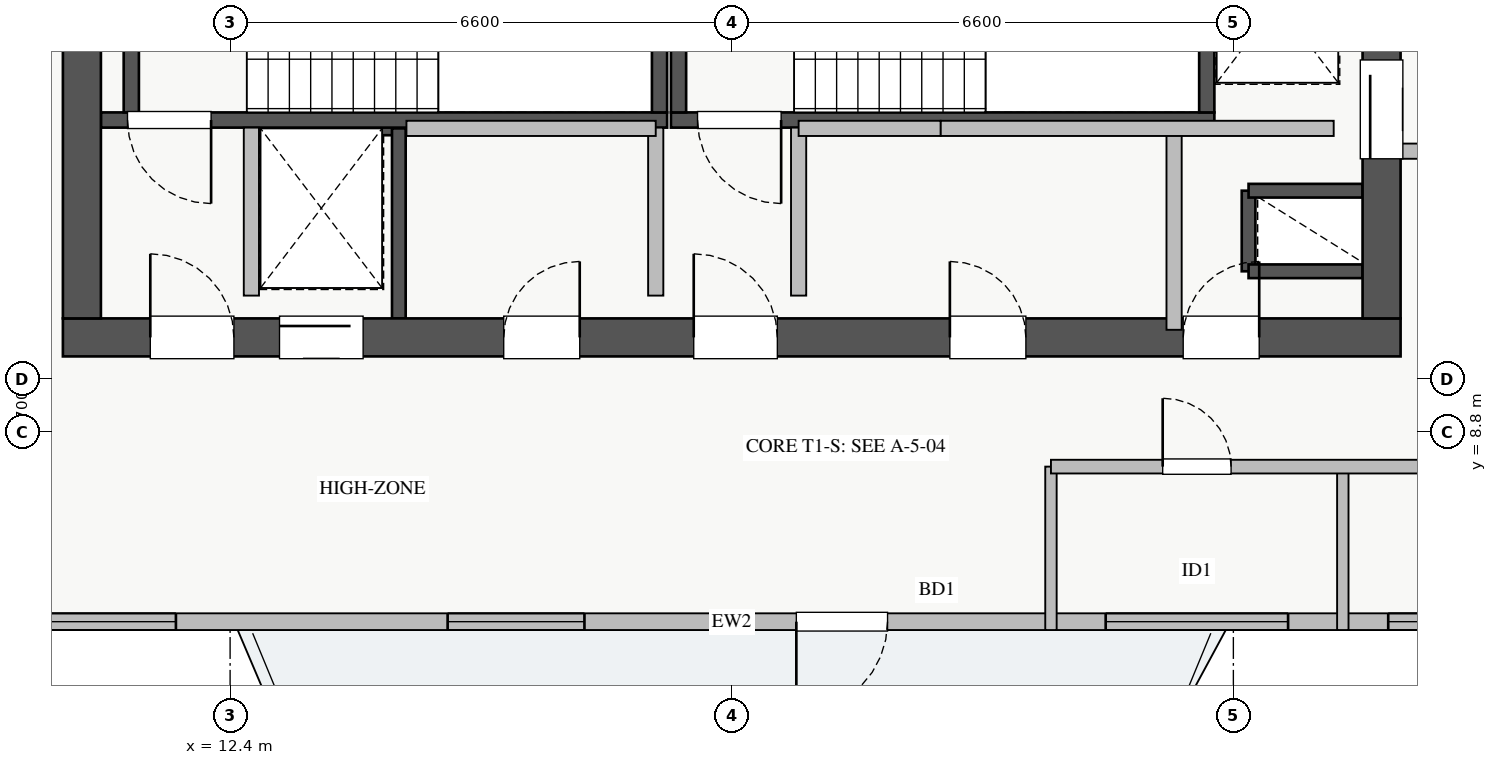
"""IFC4 building model, lengths in metres.
Left out: names, types, materials, properties, quantities, classifications, styles, units other than length and angle.
Written with IfcOpenShell. Run it as: python <this file> out.ifc"""

import sys

from ifc_helpers import new_model, si_unit, direction, frame, frame_2d, origin, place, context, subcontext, project, spatial, rectangle, extrude, source, transform, mapped, element, fill, save


model = new_model("IFC4")
c1 = context("Model", 3, precision=1e-05, world=origin(), true_north=direction((0.0, 1.0)))
c2 = subcontext(c1, "Body", "Model", "MODEL_VIEW")
j1 = project(units=[si_unit("LENGTHUNIT", "METRE"), si_unit("PLANEANGLEUNIT", "RADIAN")], contexts=[c1])
p1 = place(None, origin())
s1 = spatial("IfcSite", under=j1, at=p1, CompositionType="ELEMENT")
p2 = place(p1, origin())
s2 = spatial("IfcBuilding", under=s1, at=p2, CompositionType="ELEMENT")
p3 = place(p2, frame((0.0, 0.0, 226.25)))
s3 = spatial("IfcBuildingStorey", under=s2, at=p3, CompositionType="ELEMENT", Elevation=226.25)
p4 = place(p3, frame((12.68, 12.8, 0.0), z_axis=(0.0, 0.0, 1.0), x_axis=(1.0, 0.0, 0.0)))
e1 = element("IfcWall", 1, at=p4, inside=s3, PredefinedType="SHEAR", context=c2, shape_type="SweptSolid", body=[
    extrude(rectangle(XDim=1.94, YDim=0.18, at=frame_2d((0.97, 0.0))), origin(), (0.0, 0.0, 1.0), 3.07),
])
p5 = place(p3, frame((14.62, 10.3, 0.0), z_axis=(0.0, 0.0, 1.0), x_axis=(0.0, 1.0, 0.0)))
e2 = element("IfcWall", 2, at=p5, inside=s3, PredefinedType="SHEAR", context=c2, shape_type="SweptSolid", body=[
    extrude(rectangle(XDim=2.5, YDim=0.18, at=frame_2d((1.25, 0.0))), origin(), (0.0, 0.0, 1.0), 3.07),
])
p6 = place(p3, frame((25.8, 10.92, 0.0), z_axis=(0.0, 0.0, 1.0), x_axis=(0.0, 1.0, 0.0)))
e3 = element("IfcWall", 3, at=p6, inside=s3, PredefinedType="SHEAR", context=c2, shape_type="SweptSolid", body=[
    extrude(rectangle(XDim=1.06, YDim=0.18, at=frame_2d((0.53, 0.0))), origin(), (0.0, 0.0, 1.0), 3.07),
])
for number, where, z_axis, x_axis in (
    (4, (25.8, 11.98, 0.0), (0.0, 0.0, 1.0), (1.0, 0.0, 0.0)),
    (5, (25.8, 10.92, 0.0), (0.0, 0.0, 1.0), (1.0, 0.0, 0.0)),
):
    element("IfcWall", number, at=place(p3, frame(where, z_axis=z_axis, x_axis=x_axis)), inside=s3, PredefinedType="SHEAR", context=c2, shape_type="SweptSolid", body=[
        extrude(rectangle(XDim=1.5, YDim=0.18, at=frame_2d((0.75, 0.0))), origin(), (0.0, 0.0, 1.0), 3.07),
    ])
p7 = place(p3, frame((10.7, 12.91, 0.0), z_axis=(0.0, 0.0, 1.0), x_axis=(1.0, 0.0, 0.0)))
e6 = element("IfcWall", 6, at=p7, inside=s3, PredefinedType="SHEAR", context=c2, shape_type="SweptSolid", body=[
    extrude(rectangle(XDim=7.45, YDim=0.2, at=frame_2d((3.725, 0.0))), origin(), (0.0, 0.0, 1.0), 3.25),
])
p8 = place(p7, frame((0.35, 0.0, 0.0)))
e7 = element("IfcOpeningElement", 7, at=p8, cuts=e6, PredefinedType="OPENING", context=c2, shape_type="SweptSolid", body=[
    extrude(rectangle(XDim=1.1, YDim=2.05, at=frame_2d((0.55, 1.025))), frame((0.0, 0.11, 0.0), z_axis=(0.0, -1.0, 0.0), x_axis=(1.0, 0.0, 0.0)), (0.0, 0.0, 1.0), 0.22),
])
for number, where, z_axis, x_axis in (
    (8, (11.1, 13.01, 0.0), (0.0, 0.0, 1.0), (0.0, 1.0, 0.0)),
    (9, (18.05, 13.01, 0.0), (0.0, 0.0, 1.0), (0.0, 1.0, 0.0)),
):
    element("IfcWall", number, at=place(p3, frame(where, z_axis=z_axis, x_axis=x_axis)), inside=s3, PredefinedType="SHEAR", context=c2, shape_type="SweptSolid", body=[
        extrude(rectangle(XDim=2.94, YDim=0.2, at=frame_2d((1.47, 0.0))), origin(), (0.0, 0.0, 1.0), 3.25),
    ])
p9 = place(p3, frame((18.2, 12.91, 0.0), z_axis=(0.0, 0.0, 1.0), x_axis=(1.0, 0.0, 0.0)))
e10 = element("IfcWall", 10, at=p9, inside=s3, PredefinedType="SHEAR", context=c2, shape_type="SweptSolid", body=[
    extrude(rectangle(XDim=7.15, YDim=0.2, at=frame_2d((3.575, 0.0))), origin(), (0.0, 0.0, 1.0), 3.25),
])
p10 = place(p9, frame((0.35, 0.0, 0.0)))
e11 = element("IfcOpeningElement", 11, at=p10, cuts=e10, PredefinedType="OPENING", context=c2, shape_type="SweptSolid", body=[
    extrude(rectangle(XDim=1.1, YDim=2.05, at=frame_2d((0.55, 1.025))), frame((0.0, 0.11, 0.0), z_axis=(0.0, -1.0, 0.0), x_axis=(1.0, 0.0, 0.0)), (0.0, 0.0, 1.0), 0.22),
])
for number, where, z_axis, x_axis in (
    (12, (18.3, 13.01, 0.0), (0.0, 0.0, 1.0), (0.0, 1.0, 0.0)),
    (13, (25.25, 13.01, 0.0), (0.0, 0.0, 1.0), (0.0, 1.0, 0.0)),
):
    element("IfcWall", number, at=place(p3, frame(where, z_axis=z_axis, x_axis=x_axis)), inside=s3, PredefinedType="SHEAR", context=c2, shape_type="SweptSolid", body=[
        extrude(rectangle(XDim=2.94, YDim=0.2, at=frame_2d((1.47, 0.0))), origin(), (0.0, 0.0, 1.0), 3.25),
    ])
p11 = place(p3, frame((10.2, 10.05, 0.0), z_axis=(0.0, 0.0, 1.0), x_axis=(1.0, 0.0, 0.0)))
e14 = element("IfcWall", 14, at=p11, inside=s3, PredefinedType="SHEAR", context=c2, shape_type="SweptSolid", body=[
    extrude(rectangle(XDim=17.6, YDim=0.5, at=frame_2d((8.8, 0.0))), origin(), (0.0, 0.0, 1.0), 3.25),
])
p12 = place(p11, frame((1.15, 0.0, 0.0)))
e15 = element("IfcOpeningElement", 15, at=p12, cuts=e14, PredefinedType="OPENING", context=c2, shape_type="SweptSolid", body=[
    extrude(rectangle(XDim=1.1, YDim=2.05, at=frame_2d((0.55, 1.025))), frame((0.0, 0.26, 0.0), z_axis=(0.0, -1.0, 0.0), x_axis=(1.0, 0.0, 0.0)), (0.0, 0.0, 1.0), 0.52),
])
p13 = place(p11, frame((8.3, 0.0, 0.0)))
e16 = element("IfcOpeningElement", 16, at=p13, cuts=e14, PredefinedType="OPENING", context=c2, shape_type="SweptSolid", body=[
    extrude(rectangle(XDim=1.1, YDim=2.05, at=frame_2d((0.55, 1.025))), frame((0.0, 0.26, 0.0), z_axis=(0.0, -1.0, 0.0), x_axis=(1.0, 0.0, 0.0)), (0.0, 0.0, 1.0), 0.52),
])
p14 = place(p11, frame((2.85, 0.0, 0.0)))
e17 = element("IfcOpeningElement", 17, at=p14, cuts=e14, PredefinedType="OPENING", context=c2, shape_type="SweptSolid", body=[
    extrude(rectangle(XDim=1.1, YDim=2.05, at=frame_2d((0.55, 1.025))), frame((0.0, 0.26, 0.0), z_axis=(0.0, -1.0, 0.0), x_axis=(1.0, 0.0, 0.0)), (0.0, 0.0, 1.0), 0.52),
])
p15 = place(p11, frame((5.8, 0.0, 0.0)))
e18 = element("IfcOpeningElement", 18, at=p15, cuts=e14, PredefinedType="OPENING", context=c2, shape_type="SweptSolid", body=[
    extrude(rectangle(XDim=1.0, YDim=2.05, at=frame_2d((0.5, 1.025))), frame((0.0, 0.26, 0.0), z_axis=(0.0, -1.0, 0.0), x_axis=(1.0, 0.0, 0.0)), (0.0, 0.0, 1.0), 0.52),
])
p16 = place(p11, frame((14.74, 0.0, 0.0)))
e19 = element("IfcOpeningElement", 19, at=p16, cuts=e14, PredefinedType="OPENING", context=c2, shape_type="SweptSolid", body=[
    extrude(rectangle(XDim=1.0, YDim=2.05, at=frame_2d((0.5, 1.025))), frame((0.0, 0.26, 0.0), z_axis=(0.0, -1.0, 0.0), x_axis=(1.0, 0.0, 0.0)), (0.0, 0.0, 1.0), 0.52),
])
p17 = place(p11, frame((11.67, 0.0, 0.0)))
e20 = element("IfcOpeningElement", 20, at=p17, cuts=e14, PredefinedType="OPENING", context=c2, shape_type="SweptSolid", body=[
    extrude(rectangle(XDim=1.0, YDim=2.05, at=frame_2d((0.5, 1.025))), frame((0.0, 0.26, 0.0), z_axis=(0.0, -1.0, 0.0), x_axis=(1.0, 0.0, 0.0)), (0.0, 0.0, 1.0), 0.52),
])
p18 = place(p3, frame((10.45, 10.3, 0.0), z_axis=(0.0, 0.0, 1.0), x_axis=(0.0, 1.0, 0.0)))
e21 = element("IfcWall", 21, at=p18, inside=s3, PredefinedType="SHEAR", context=c2, shape_type="SweptSolid", body=[
    extrude(rectangle(XDim=6.2, YDim=0.5, at=frame_2d((3.1, 0.0))), origin(), (0.0, 0.0, 1.0), 3.25),
])
p19 = place(p3, frame((27.55, 10.3, 0.0), z_axis=(0.0, 0.0, 1.0), x_axis=(0.0, 1.0, 0.0)))
e22 = element("IfcWall", 22, at=p19, inside=s3, PredefinedType="SHEAR", context=c2, shape_type="SweptSolid", body=[
    extrude(rectangle(XDim=6.2, YDim=0.5, at=frame_2d((3.1, 0.0))), origin(), (0.0, 0.0, 1.0), 3.25),
])
p20 = place(p19, frame((2.1, 0.0, 0.0)))
e23 = element("IfcOpeningElement", 23, at=p20, cuts=e22, PredefinedType="OPENING", context=c2, shape_type="SweptSolid", body=[
    extrude(rectangle(XDim=1.3, YDim=2.05, at=frame_2d((0.65, 1.025))), frame((0.0, 0.26, 0.0), z_axis=(0.0, -1.0, 0.0), x_axis=(1.0, 0.0, 0.0)), (0.0, 0.0, 1.0), 0.52),
])
p21 = place(p3, frame((7.65, 6.31, 0.0), z_axis=(0.0, 0.0, 1.0), x_axis=(1.0, 0.0, 0.0)))
e24 = element("IfcWall", 24, at=p21, inside=s3, PredefinedType="STANDARD", context=c2, shape_type="SweptSolid", body=[
    extrude(rectangle(XDim=22.7, YDim=0.22, at=frame_2d((11.35, 0.0))), origin(), (0.0, 0.0, 1.0), 2.61),
])
p22 = place(p21, frame((12.2, 0.0, 0.0)))
e25 = element("IfcOpeningElement", 25, at=p22, cuts=e24, PredefinedType="OPENING", context=c2, shape_type="SweptSolid", body=[
    extrude(rectangle(XDim=1.2, YDim=2.1, at=frame_2d((0.6, 1.05))), frame((0.0, 0.12, 0.0), z_axis=(0.0, -1.0, 0.0), x_axis=(1.0, 0.0, 0.0)), (0.0, 0.0, 1.0), 0.24),
])
p23 = place(p21, frame((1.637, 0.0, 0.9)))
e26 = element("IfcOpeningElement", 26, at=p23, cuts=e24, PredefinedType="OPENING", context=c2, shape_type="SweptSolid", body=[
    extrude(rectangle(XDim=2.4, YDim=1.48, at=frame_2d((1.2, 0.74))), frame((0.0, 0.12, 0.0), z_axis=(0.0, -1.0, 0.0), x_axis=(1.0, 0.0, 0.0)), (0.0, 0.0, 1.0), 0.24),
])
p24 = place(p21, frame((7.612, 0.0, 0.9)))
e27 = element("IfcOpeningElement", 27, at=p24, cuts=e24, PredefinedType="OPENING", context=c2, shape_type="SweptSolid", body=[
    extrude(rectangle(XDim=1.8, YDim=1.45, at=frame_2d((0.9, 0.725))), frame((0.0, 0.12, 0.0), z_axis=(0.0, -1.0, 0.0), x_axis=(1.0, 0.0, 0.0)), (0.0, 0.0, 1.0), 0.24),
])
p25 = place(p21, frame((19.988, 0.0, 0.9)))
e28 = element("IfcOpeningElement", 28, at=p25, cuts=e24, PredefinedType="OPENING", context=c2, shape_type="SweptSolid", body=[
    extrude(rectangle(XDim=2.1, YDim=1.5, at=frame_2d((1.05, 0.75))), frame((0.0, 0.12, 0.0), z_axis=(0.0, -1.0, 0.0), x_axis=(1.0, 0.0, 0.0)), (0.0, 0.0, 1.0), 0.24),
])
p26 = place(p21, frame((16.27, 0.0, 0.9)))
e29 = element("IfcOpeningElement", 29, at=p26, cuts=e24, PredefinedType="OPENING", context=c2, shape_type="SweptSolid", body=[
    extrude(rectangle(XDim=2.4, YDim=1.5, at=frame_2d((1.2, 0.75))), frame((0.0, 0.12, 0.0), z_axis=(0.0, -1.0, 0.0), x_axis=(1.0, 0.0, 0.0)), (0.0, 0.0, 1.0), 0.24),
])
p27 = place(p3, frame((27.8, 12.5, 0.0), z_axis=(0.0, 0.0, 1.0), x_axis=(1.0, 0.0, 0.0)))
e30 = element("IfcWall", 30, at=p27, inside=s3, PredefinedType="PARTITIONING", context=c2, shape_type="SweptSolid", body=[
    extrude(rectangle(XDim=3.1, YDim=0.2, at=frame_2d((1.55, 0.0))), origin(), (0.0, 0.0, 1.0), 2.265),
])
for number, where, z_axis, x_axis in (
    (31, (12.68, 10.6, 0.0), (0.0, 0.0, 1.0), (0.0, 1.0, 0.0)),
    (32, (18.0, 10.6, 0.0), (0.0, 0.0, 1.0), (0.0, 1.0, 0.0)),
    (33, (19.88, 10.6, 0.0), (0.0, 0.0, 1.0), (0.0, 1.0, 0.0)),
):
    element("IfcWall", number, at=place(p3, frame(where, z_axis=z_axis, x_axis=x_axis)), inside=s3, PredefinedType="PARTITIONING", context=c2, shape_type="SweptSolid", body=[
        extrude(rectangle(XDim=2.21, YDim=0.2, at=frame_2d((1.105, 0.0))), origin(), (0.0, 0.0, 1.0), 3.07),
    ])
p28 = place(p3, frame((14.72, 12.8, 0.0), z_axis=(0.0, 0.0, 1.0), x_axis=(1.0, 0.0, 0.0)))
e34 = element("IfcWall", 34, at=p28, inside=s3, PredefinedType="PARTITIONING", context=c2, shape_type="SweptSolid", body=[
    extrude(rectangle(XDim=3.28, YDim=0.2, at=frame_2d((1.64, 0.0))), origin(), (0.0, 0.0, 1.0), 3.07),
])
p29 = place(p3, frame((24.82, 10.15, 0.0), z_axis=(0.0, 0.0, 1.0), x_axis=(0.0, 1.0, 0.0)))
e35 = element("IfcWall", 35, at=p29, inside=s3, PredefinedType="PARTITIONING", context=c2, shape_type="SweptSolid", body=[
    extrude(rectangle(XDim=2.65, YDim=0.2, at=frame_2d((1.325, 0.0))), origin(), (0.0, 0.0, 1.0), 3.07),
])
p30 = place(p3, frame((19.88, 12.8, 0.0), z_axis=(0.0, 0.0, 1.0), x_axis=(1.0, 0.0, 0.0)))
e36 = element("IfcWall", 36, at=p30, inside=s3, PredefinedType="PARTITIONING", context=c2, shape_type="SweptSolid", body=[
    extrude(rectangle(XDim=1.87, YDim=0.2, at=frame_2d((0.935, 0.0))), origin(), (0.0, 0.0, 1.0), 3.07),
])
p31 = place(p3, frame((21.75, 12.8, 0.0), z_axis=(0.0, 0.0, 1.0), x_axis=(1.0, 0.0, 0.0)))
e37 = element("IfcWall", 37, at=p31, inside=s3, PredefinedType="PARTITIONING", context=c2, shape_type="SweptSolid", body=[
    extrude(rectangle(XDim=5.17, YDim=0.2, at=frame_2d((2.585, 0.0))), origin(), (0.0, 0.0, 1.0), 3.07),
])
for number, where, z_axis, x_axis in (
    (38, (23.2, 6.2, 0.0), (0.0, 0.0, 1.0), (0.0, 1.0, 0.0)),
    (39, (27.04, 6.2, 0.0), (0.0, 0.0, 1.0), (0.0, 1.0, 0.0)),
):
    element("IfcWall", number, at=place(p3, frame(where, z_axis=z_axis, x_axis=x_axis)), inside=s3, PredefinedType="PARTITIONING", context=c2, shape_type="SweptSolid", body=[
        extrude(rectangle(XDim=2.15, YDim=0.15, at=frame_2d((1.075, 0.0))), origin(), (0.0, 0.0, 1.0), 3.07),
    ])
p32 = place(p3, frame((23.2, 8.35, 0.0), z_axis=(0.0, 0.0, 1.0), x_axis=(1.0, 0.0, 0.0)))
e40 = element("IfcWall", 40, at=p32, inside=s3, PredefinedType="PARTITIONING", context=c2, shape_type="SweptSolid", body=[
    extrude(rectangle(XDim=9.25, YDim=0.18, at=frame_2d((4.625, 0.0))), origin(), (0.0, 0.0, 1.0), 3.07),
])
p33 = place(p32, frame((1.47, 0.0, 0.0)))
e41 = element("IfcOpeningElement", 41, at=p33, cuts=e40, PredefinedType="OPENING", context=c2, shape_type="SweptSolid", body=[
    extrude(rectangle(XDim=0.9, YDim=2.05, at=frame_2d((0.45, 1.025))), frame((0.0, 0.1, 0.0), z_axis=(0.0, -1.0, 0.0), x_axis=(1.0, 0.0, 0.0)), (0.0, 0.0, 1.0), 0.2),
])
p34 = place(p32, frame((5.164, 0.0, 0.0)))
e42 = element("IfcOpeningElement", 42, at=p34, cuts=e40, PredefinedType="OPENING", context=c2, shape_type="SweptSolid", body=[
    extrude(rectangle(XDim=0.9, YDim=2.05, at=frame_2d((0.45, 1.025))), frame((0.0, 0.1, 0.0), z_axis=(0.0, -1.0, 0.0), x_axis=(1.0, 0.0, 0.0)), (0.0, 0.0, 1.0), 0.2),
])
m1 = source(origin(), c2, "Body", "SweptSolid", [
    extrude(rectangle(XDim=1.2, YDim=2.1, at=frame_2d((0.6, 1.05))), frame((0.0, 0.025, 0.0), z_axis=(0.0, -1.0, 0.0), x_axis=(1.0, 0.0, 0.0)), (0.0, 0.0, 1.0), 0.05),
])
p35 = place(p22, frame((1.2, 0.0, 0.0), z_axis=(0.0, 0.0, 1.0), x_axis=(-1.0, 0.0, 0.0)))
e43 = element("IfcDoor", 43, at=p35, inside=s3, OperationType="SINGLE_SWING_LEFT", PredefinedType="DOOR", context=c2, shape_type="MappedRepresentation", body=[
    mapped(m1, transform((0.0, 0.0, 0.0), x_axis=(1.0, 0.0, 0.0), y_axis=(0.0, 1.0, 0.0), z_axis=(0.0, 0.0, 1.0), scale=1.0)),
])
fill(e25, e43)
m2 = source(origin(), c2, "Body", "SweptSolid", [
    extrude(rectangle(XDim=2.4, YDim=1.48, at=frame_2d((1.2, 0.74))), frame((0.0, 0.03, 0.0), z_axis=(0.0, -1.0, 0.0), x_axis=(1.0, 0.0, 0.0)), (0.0, 0.0, 1.0), 0.06),
])
p36 = place(p23, origin())
e44 = element("IfcWindow", 44, at=p36, inside=s3, PartitioningType="TRIPLE_PANEL_VERTICAL", PredefinedType="WINDOW", context=c2, shape_type="MappedRepresentation", body=[
    mapped(m2, transform((0.0, 0.0, 0.0), x_axis=(1.0, 0.0, 0.0), y_axis=(0.0, 1.0, 0.0), z_axis=(0.0, 0.0, 1.0), scale=1.0)),
])
fill(e26, e44)
m3 = source(origin(), c2, "Body", "SweptSolid", [
    extrude(rectangle(XDim=1.8, YDim=1.45, at=frame_2d((0.9, 0.725))), frame((0.0, 0.03, 0.0), z_axis=(0.0, -1.0, 0.0), x_axis=(1.0, 0.0, 0.0)), (0.0, 0.0, 1.0), 0.06),
])
p37 = place(p24, origin())
e45 = element("IfcWindow", 45, at=p37, inside=s3, PartitioningType="DOUBLE_PANEL_VERTICAL", PredefinedType="WINDOW", context=c2, shape_type="MappedRepresentation", body=[
    mapped(m3, transform((0.0, 0.0, 0.0), x_axis=(1.0, 0.0, 0.0), y_axis=(0.0, 1.0, 0.0), z_axis=(0.0, 0.0, 1.0), scale=1.0)),
])
fill(e27, e45)
m4 = source(origin(), c2, "Body", "SweptSolid", [
    extrude(rectangle(XDim=2.1, YDim=1.5, at=frame_2d((1.05, 0.75))), frame((0.0, 0.03, 0.0), z_axis=(0.0, -1.0, 0.0), x_axis=(1.0, 0.0, 0.0)), (0.0, 0.0, 1.0), 0.06),
])
p38 = place(p25, origin())
e46 = element("IfcWindow", 46, at=p38, inside=s3, PartitioningType="TRIPLE_PANEL_VERTICAL", PredefinedType="WINDOW", context=c2, shape_type="MappedRepresentation", body=[
    mapped(m4, transform((0.0, 0.0, 0.0), x_axis=(1.0, 0.0, 0.0), y_axis=(0.0, 1.0, 0.0), z_axis=(0.0, 0.0, 1.0), scale=1.0)),
])
fill(e28, e46)
m5 = source(origin(), c2, "Body", "SweptSolid", [
    extrude(rectangle(XDim=1.3, YDim=2.05, at=frame_2d((0.65, 1.025))), frame((0.0, 0.025, 0.0), z_axis=(0.0, -1.0, 0.0), x_axis=(1.0, 0.0, 0.0)), (0.0, 0.0, 1.0), 0.05),
])
p39 = place(p20, origin())
e47 = element("IfcDoor", 47, at=p39, inside=s3, OperationType="SLIDING_TO_RIGHT", PredefinedType="DOOR", context=c2, shape_type="MappedRepresentation", body=[
    mapped(m5, transform((0.0, 0.0, 0.0), x_axis=(1.0, 0.0, 0.0), y_axis=(0.0, 1.0, 0.0), z_axis=(0.0, 0.0, 1.0), scale=1.0)),
])
fill(e23, e47)
m6 = source(origin(), c2, "Body", "SweptSolid", [
    extrude(rectangle(XDim=1.1, YDim=2.05, at=frame_2d((0.55, 1.025))), frame((0.0, 0.025, 0.0), z_axis=(0.0, -1.0, 0.0), x_axis=(1.0, 0.0, 0.0)), (0.0, 0.0, 1.0), 0.05),
])
p40 = place(p12, origin())
e48 = element("IfcDoor", 48, at=p40, inside=s3, OperationType="SINGLE_SWING_LEFT", PredefinedType="DOOR", context=c2, shape_type="MappedRepresentation", body=[
    mapped(m6, transform((0.0, 0.0, 0.0), x_axis=(1.0, 0.0, 0.0), y_axis=(0.0, 1.0, 0.0), z_axis=(0.0, 0.0, 1.0), scale=1.0)),
])
fill(e15, e48)
p41 = place(p8, frame((1.1, 0.0, 0.0), z_axis=(0.0, 0.0, 1.0), x_axis=(-1.0, 0.0, 0.0)))
e49 = element("IfcDoor", 49, at=p41, inside=s3, OperationType="SINGLE_SWING_RIGHT", PredefinedType="DOOR", context=c2, shape_type="MappedRepresentation", body=[
    mapped(m6, transform((0.0, 0.0, 0.0), x_axis=(1.0, 0.0, 0.0), y_axis=(0.0, 1.0, 0.0), z_axis=(0.0, 0.0, 1.0), scale=1.0)),
])
fill(e7, e49)
p42 = place(p13, origin())
e50 = element("IfcDoor", 50, at=p42, inside=s3, OperationType="SINGLE_SWING_LEFT", PredefinedType="DOOR", context=c2, shape_type="MappedRepresentation", body=[
    mapped(m6, transform((0.0, 0.0, 0.0), x_axis=(1.0, 0.0, 0.0), y_axis=(0.0, 1.0, 0.0), z_axis=(0.0, 0.0, 1.0), scale=1.0)),
])
fill(e16, e50)
p43 = place(p10, frame((1.1, 0.0, 0.0), z_axis=(0.0, 0.0, 1.0), x_axis=(-1.0, 0.0, 0.0)))
e51 = element("IfcDoor", 51, at=p43, inside=s3, OperationType="SINGLE_SWING_RIGHT", PredefinedType="DOOR", context=c2, shape_type="MappedRepresentation", body=[
    mapped(m6, transform((0.0, 0.0, 0.0), x_axis=(1.0, 0.0, 0.0), y_axis=(0.0, 1.0, 0.0), z_axis=(0.0, 0.0, 1.0), scale=1.0)),
])
fill(e11, e51)
p44 = place(p14, origin())
e52 = element("IfcDoor", 52, at=p44, inside=s3, OperationType="SLIDING_TO_RIGHT", PredefinedType="DOOR", context=c2, shape_type="MappedRepresentation", body=[
    mapped(m6, transform((0.0, 0.0, 0.0), x_axis=(1.0, 0.0, 0.0), y_axis=(0.0, 1.0, 0.0), z_axis=(0.0, 0.0, 1.0), scale=1.0)),
])
fill(e17, e52)
m7 = source(origin(), c2, "Body", "SweptSolid", [
    extrude(rectangle(XDim=1.0, YDim=2.05, at=frame_2d((0.5, 1.025))), frame((0.0, 0.025, 0.0), z_axis=(0.0, -1.0, 0.0), x_axis=(1.0, 0.0, 0.0)), (0.0, 0.0, 1.0), 0.05),
])
p45 = place(p15, origin())
e53 = element("IfcDoor", 53, at=p45, inside=s3, OperationType="SINGLE_SWING_RIGHT", PredefinedType="DOOR", context=c2, shape_type="MappedRepresentation", body=[
    mapped(m7, transform((0.0, 0.0, 0.0), x_axis=(1.0, 0.0, 0.0), y_axis=(0.0, 1.0, 0.0), z_axis=(0.0, 0.0, 1.0), scale=1.0)),
])
fill(e18, e53)
p46 = place(p16, origin())
e54 = element("IfcDoor", 54, at=p46, inside=s3, OperationType="SINGLE_SWING_RIGHT", PredefinedType="DOOR", context=c2, shape_type="MappedRepresentation", body=[
    mapped(m7, transform((0.0, 0.0, 0.0), x_axis=(1.0, 0.0, 0.0), y_axis=(0.0, 1.0, 0.0), z_axis=(0.0, 0.0, 1.0), scale=1.0)),
])
fill(e19, e54)
p47 = place(p17, origin())
e55 = element("IfcDoor", 55, at=p47, inside=s3, OperationType="SINGLE_SWING_LEFT", PredefinedType="DOOR", context=c2, shape_type="MappedRepresentation", body=[
    mapped(m7, transform((0.0, 0.0, 0.0), x_axis=(1.0, 0.0, 0.0), y_axis=(0.0, 1.0, 0.0), z_axis=(0.0, 0.0, 1.0), scale=1.0)),
])
fill(e20, e55)
m8 = source(origin(), c2, "Body", "SweptSolid", [
    extrude(rectangle(XDim=0.9, YDim=2.05, at=frame_2d((0.45, 1.025))), frame((0.0, 0.025, 0.0), z_axis=(0.0, -1.0, 0.0), x_axis=(1.0, 0.0, 0.0)), (0.0, 0.0, 1.0), 0.05),
])
p48 = place(p33, origin())
e56 = element("IfcDoor", 56, at=p48, inside=s3, OperationType="SINGLE_SWING_LEFT", PredefinedType="DOOR", context=c2, shape_type="MappedRepresentation", body=[
    mapped(m8, transform((0.0, 0.0, 0.0), x_axis=(1.0, 0.0, 0.0), y_axis=(0.0, 1.0, 0.0), z_axis=(0.0, 0.0, 1.0), scale=1.0)),
])
fill(e41, e56)
m9 = source(origin(), c2, "Body", "SweptSolid", [
    extrude(rectangle(XDim=2.4, YDim=1.5, at=frame_2d((1.2, 0.75))), frame((0.0, 0.03, 0.0), z_axis=(0.0, -1.0, 0.0), x_axis=(1.0, 0.0, 0.0)), (0.0, 0.0, 1.0), 0.06),
])
p49 = place(p26, origin())
e57 = element("IfcWindow", 57, at=p49, inside=s3, PartitioningType="TRIPLE_PANEL_VERTICAL", PredefinedType="WINDOW", context=c2, shape_type="MappedRepresentation", body=[
    mapped(m9, transform((0.0, 0.0, 0.0), x_axis=(1.0, 0.0, 0.0), y_axis=(0.0, 1.0, 0.0), z_axis=(0.0, 0.0, 1.0), scale=1.0)),
])
fill(e29, e57)
save(model, sys.argv[1])
